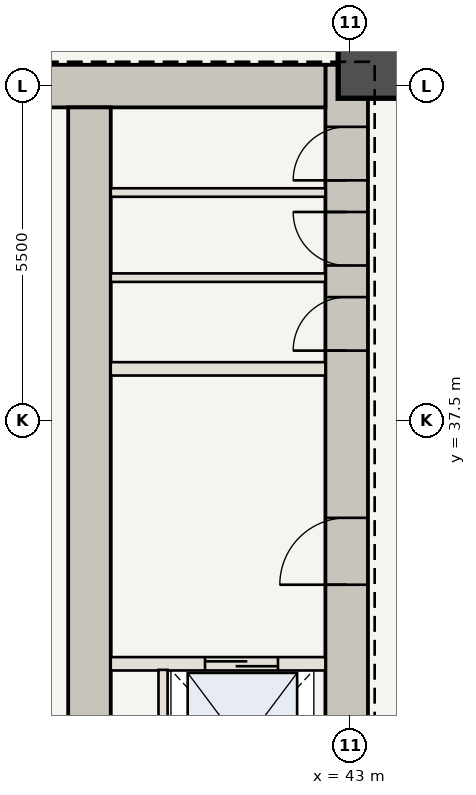
"""IFC4 building model, lengths in metres.
Left out: names, types, materials, properties, quantities, classifications, styles, units other than length and angle.
Written with IfcOpenShell. Run it as: python <this file> out.ifc"""

import sys

from ifc_helpers import new_model, si_unit, direction, frame, frame_2d, origin, origin_2d, place, context, subcontext, project, spatial, rectangle, extrude, element, fill, save


model = new_model("IFC4")
c1 = context("Model", 3, precision=1e-05, world=origin(), true_north=direction((0.0, 1.0)))
c2 = subcontext(c1, "Body", "Model", "MODEL_VIEW")
j1 = project(units=[si_unit("LENGTHUNIT", "METRE"), si_unit("PLANEANGLEUNIT", "RADIAN")], contexts=[c1])
p1 = place(None, origin())
s1 = spatial("IfcSite", under=j1, at=p1, CompositionType="ELEMENT")
p2 = place(p1, origin())
s2 = spatial("IfcBuilding", under=s1, at=p2, CompositionType="ELEMENT")
p3 = place(p2, frame((0.0, 0.0, 70.35)))
s3 = spatial("IfcBuildingStorey", under=s2, at=p3, CompositionType="ELEMENT", Elevation=70.35)
p4 = place(p3, frame((42.94, 30.6, 0.0), z_axis=(0.0, 0.0, 1.0), x_axis=(0.0, 1.0, 0.0)))
e1 = element("IfcWall", 1, at=p4, inside=s3, PredefinedType="SHEAR", context=c2, shape_type="SweptSolid", body=[
    extrude(rectangle(XDim=12.75, YDim=0.7, at=frame_2d((6.375, 0.0))), origin(), (0.0, 0.0, 1.0), 3.5),
])
p5 = place(p4, frame((4.2, 0.0, 0.0)))
e2 = element("IfcOpeningElement", 2, at=p5, cuts=e1, PredefinedType="OPENING", context=c2, shape_type="SweptSolid", body=[
    extrude(rectangle(XDim=1.1, YDim=2.15, at=frame_2d((0.55, 1.075))), frame((0.0, 0.36, 0.0), z_axis=(0.0, -1.0, 0.0), x_axis=(1.0, 0.0, 0.0)), (0.0, 0.0, 1.0), 0.72),
])
p6 = place(p4, frame((8.05, 0.0, 0.0)))
e3 = element("IfcOpeningElement", 3, at=p6, cuts=e1, PredefinedType="OPENING", context=c2, shape_type="SweptSolid", body=[
    extrude(rectangle(XDim=0.88, YDim=2.1, at=frame_2d((0.44, 1.05))), frame((0.0, 0.36, 0.0), z_axis=(0.0, -1.0, 0.0), x_axis=(1.0, 0.0, 0.0)), (0.0, 0.0, 1.0), 0.72),
])
p7 = place(p4, frame((9.45, 0.0, 0.0)))
e4 = element("IfcOpeningElement", 4, at=p7, cuts=e1, PredefinedType="OPENING", context=c2, shape_type="SweptSolid", body=[
    extrude(rectangle(XDim=0.88, YDim=2.1, at=frame_2d((0.44, 1.05))), frame((0.0, 0.36, 0.0), z_axis=(0.0, -1.0, 0.0), x_axis=(1.0, 0.0, 0.0)), (0.0, 0.0, 1.0), 0.72),
])
p8 = place(p4, frame((10.85, 0.0, 0.0)))
e5 = element("IfcOpeningElement", 5, at=p8, cuts=e1, PredefinedType="OPENING", context=c2, shape_type="SweptSolid", body=[
    extrude(rectangle(XDim=0.88, YDim=2.1, at=frame_2d((0.44, 1.05))), frame((0.0, 0.36, 0.0), z_axis=(0.0, -1.0, 0.0), x_axis=(1.0, 0.0, 0.0)), (0.0, 0.0, 1.0), 0.72),
])
p9 = place(p3, frame((37.75, 43.0, 0.0), z_axis=(0.0, 0.0, 1.0), x_axis=(1.0, 0.0, 0.0)))
e6 = element("IfcWall", 6, at=p9, inside=s3, PredefinedType="SHEAR", context=c2, shape_type="SweptSolid", body=[
    extrude(rectangle(XDim=4.84, YDim=0.7, at=frame_2d((2.42, 0.0))), origin(), (0.0, 0.0, 1.0), 3.5),
])
p10 = place(p3, frame((38.71, 30.6, 0.0), z_axis=(0.0, 0.0, 1.0), x_axis=(0.0, 1.0, 0.0)))
e7 = element("IfcWall", 7, at=p10, inside=s3, PredefinedType="SHEAR", context=c2, shape_type="SweptSolid", body=[
    extrude(rectangle(XDim=12.05, YDim=0.7, at=frame_2d((6.025, 0.0))), origin(), (0.0, 0.0, 1.0), 3.5),
])
p11 = place(p3, frame((43.35, 43.35, 0.0), z_axis=(0.0, 0.0, 1.0), x_axis=(1.0, 0.0, 0.0)))
e8 = element("IfcColumn", 8, at=p11, inside=s3, PredefinedType="COLUMN", context=c2, shape_type="SweptSolid", body=[
    extrude(rectangle(XDim=1.1, YDim=1.1, at=origin_2d()), origin(), (0.0, 0.0, 1.0), 3.5),
])
p12 = place(p3, frame((39.06, 33.5, 0.0), z_axis=(0.0, 0.0, 1.0), x_axis=(1.0, 0.0, 0.0)))
e9 = element("IfcWall", 9, at=p12, inside=s3, PredefinedType="STANDARD", context=c2, shape_type="SweptSolid", body=[
    extrude(rectangle(XDim=3.53, YDim=0.22, at=frame_2d((1.765, 0.0))), origin(), (0.0, 0.0, 1.0), 3.32),
])
p13 = place(p12, frame((1.55, 0.0, 0.0)))
e10 = element("IfcOpeningElement", 10, at=p13, cuts=e9, PredefinedType="OPENING", context=c2, shape_type="SweptSolid", body=[
    extrude(rectangle(XDim=1.2, YDim=2.2, at=frame_2d((0.6, 1.1))), frame((0.0, 0.12, 0.0), z_axis=(0.0, -1.0, 0.0), x_axis=(1.0, 0.0, 0.0)), (0.0, 0.0, 1.0), 0.24),
])
p14 = place(p3, frame((39.92, 30.75, 0.0), z_axis=(0.0, 0.0, 1.0), x_axis=(0.0, 1.0, 0.0)))
e11 = element("IfcWall", 11, at=p14, inside=s3, PredefinedType="STANDARD", context=c2, shape_type="SweptSolid", body=[
    extrude(rectangle(XDim=2.65, YDim=0.15, at=frame_2d((1.325, 0.0))), origin(), (0.0, 0.0, 1.0), 3.32),
])
p15 = place(p3, frame((39.06, 38.35, 0.0), z_axis=(0.0, 0.0, 1.0), x_axis=(1.0, 0.0, 0.0)))
e12 = element("IfcWall", 12, at=p15, inside=s3, PredefinedType="STANDARD", context=c2, shape_type="SweptSolid", body=[
    extrude(rectangle(XDim=3.53, YDim=0.22, at=frame_2d((1.765, 0.0))), origin(), (0.0, 0.0, 1.0), 3.32),
])
for number, where, z_axis, x_axis in (
    (13, (39.06, 39.85, 0.0), (0.0, 0.0, 1.0), (1.0, 0.0, 0.0)),
    (14, (39.06, 41.25, 0.0), (0.0, 0.0, 1.0), (1.0, 0.0, 0.0)),
):
    element("IfcWall", number, at=place(p3, frame(where, z_axis=z_axis, x_axis=x_axis)), inside=s3, PredefinedType="STANDARD", context=c2, shape_type="SweptSolid", body=[
        extrude(rectangle(XDim=3.53, YDim=0.14, at=frame_2d((1.765, 0.0))), origin(), (0.0, 0.0, 1.0), 3.32),
    ])
p16 = place(p5, origin())
e15 = element("IfcDoor", 15, at=p16, inside=s3, OperationType="SINGLE_SWING_LEFT", PredefinedType="DOOR", context=c2, shape_type="SweptSolid", body=[
    extrude(rectangle(XDim=1.1, YDim=2.15, at=frame_2d((0.55, 1.075))), frame((0.0, 0.025, 0.0), z_axis=(0.0, -1.0, 0.0), x_axis=(1.0, 0.0, 0.0)), (0.0, 0.0, 1.0), 0.05),
])
fill(e2, e15)
p17 = place(p6, origin())
e16 = element("IfcDoor", 16, at=p17, inside=s3, OperationType="SINGLE_SWING_LEFT", PredefinedType="DOOR", context=c2, shape_type="SweptSolid", body=[
    extrude(rectangle(XDim=0.88, YDim=2.1, at=frame_2d((0.44, 1.05))), frame((0.0, 0.025, 0.0), z_axis=(0.0, -1.0, 0.0), x_axis=(1.0, 0.0, 0.0)), (0.0, 0.0, 1.0), 0.05),
])
fill(e3, e16)
p18 = place(p7, origin())
e17 = element("IfcDoor", 17, at=p18, inside=s3, OperationType="SINGLE_SWING_RIGHT", PredefinedType="DOOR", context=c2, shape_type="SweptSolid", body=[
    extrude(rectangle(XDim=0.88, YDim=2.1, at=frame_2d((0.44, 1.05))), frame((0.0, 0.025, 0.0), z_axis=(0.0, -1.0, 0.0), x_axis=(1.0, 0.0, 0.0)), (0.0, 0.0, 1.0), 0.05),
])
fill(e4, e17)
p19 = place(p8, origin())
e18 = element("IfcDoor", 18, at=p19, inside=s3, OperationType="SINGLE_SWING_LEFT", PredefinedType="DOOR", context=c2, shape_type="SweptSolid", body=[
    extrude(rectangle(XDim=0.88, YDim=2.1, at=frame_2d((0.44, 1.05))), frame((0.0, 0.025, 0.0), z_axis=(0.0, -1.0, 0.0), x_axis=(1.0, 0.0, 0.0)), (0.0, 0.0, 1.0), 0.05),
])
fill(e5, e18)
p20 = place(p13, origin())
e19 = element("IfcDoor", 19, at=p20, inside=s3, OperationType="DOUBLE_DOOR_SLIDING", PredefinedType="DOOR", context=c2, shape_type="SweptSolid", body=[
    extrude(rectangle(XDim=1.2, YDim=2.2, at=frame_2d((0.6, 1.1))), frame((0.0, 0.025, 0.0), z_axis=(0.0, -1.0, 0.0), x_axis=(1.0, 0.0, 0.0)), (0.0, 0.0, 1.0), 0.05),
])
fill(e10, e19)
save(model, sys.argv[1])
